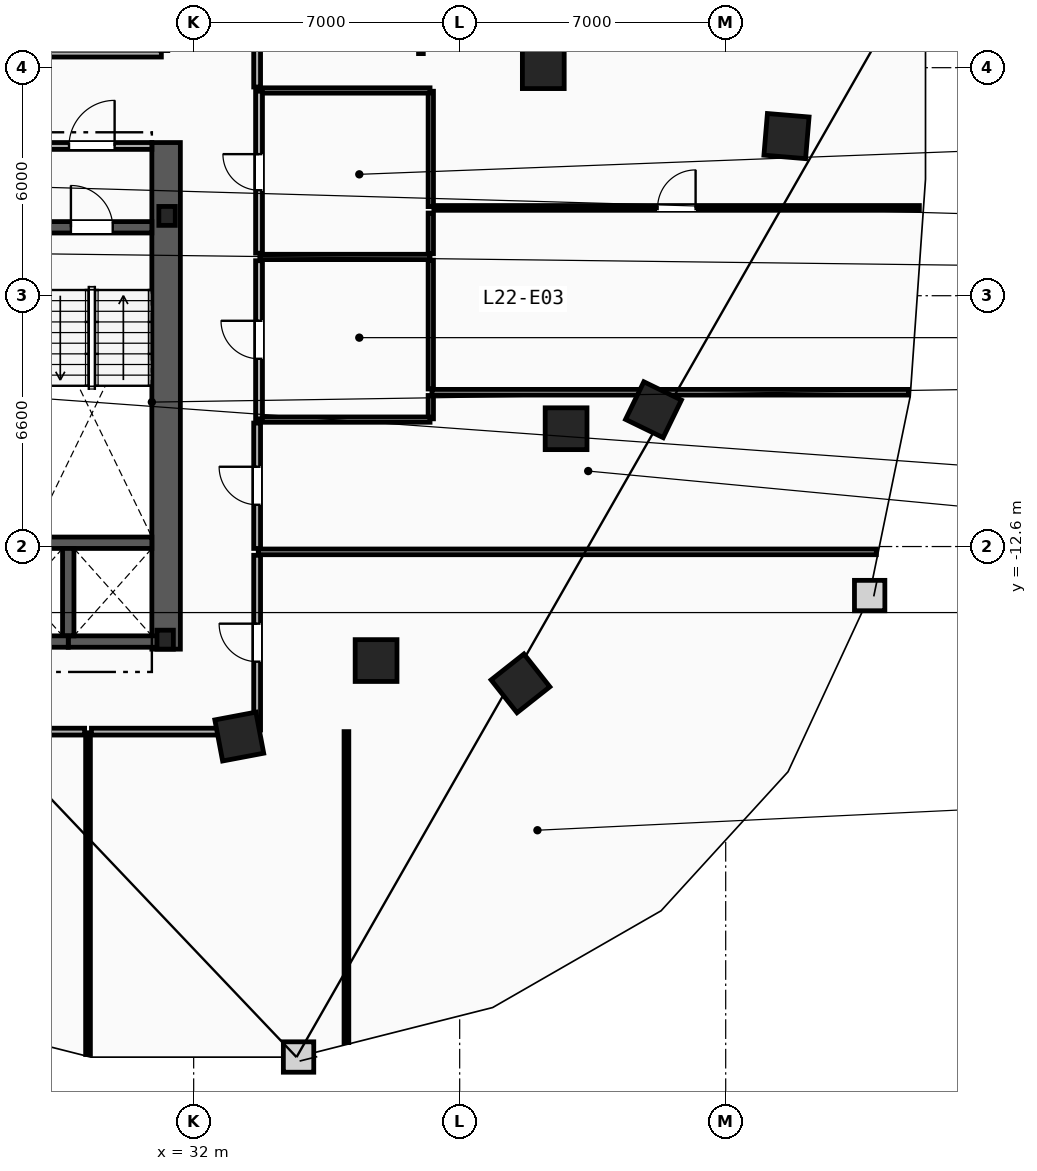
"""IFC4 building model, lengths in metres.
Left out: names, types, materials, properties, quantities, classifications, styles, units other than length and angle.
Written with IfcOpenShell. Run it as: python <this file> out.ifc"""

import sys

from ifc_helpers import new_model, si_unit, direction, frame, frame_2d, origin, origin_2d, place, context, subcontext, project, spatial, rectangle, i_section, extrude, element, fill, save


model = new_model("IFC4")
c1 = context("Model", 3, precision=1e-05, world=origin(), true_north=direction((0.0, 1.0)))
c2 = subcontext(c1, "Body", "Model", "MODEL_VIEW")
j1 = project(units=[si_unit("LENGTHUNIT", "METRE"), si_unit("PLANEANGLEUNIT", "RADIAN")], contexts=[c1])
p1 = place(None, origin())
s1 = spatial("IfcSite", under=j1, at=p1, CompositionType="ELEMENT")
p2 = place(p1, origin())
s2 = spatial("IfcBuilding", under=s1, at=p2, CompositionType="ELEMENT")
p3 = place(p2, frame((0.0, 0.0, 89.0)))
s3 = spatial("IfcBuildingStorey", under=s2, at=p3, CompositionType="ELEMENT", Elevation=89.0)
for number, where, z_axis, x_axis in (
    (1, (31.3, -3.9, 0.0), (0.0, 0.0, 1.0), (1.0, 0.0, 0.0)),
    (2, (31.25, -15.05, 0.0), (0.0, 0.0, 1.0), (1.0, 0.0, 0.0)),
):
    element("IfcColumn", number, at=place(p3, frame(where, z_axis=z_axis, x_axis=x_axis)), inside=s3, PredefinedType="COLUMN", context=c2, shape_type="SweptSolid", body=[
        extrude(i_section(OverallWidth=0.432, OverallDepth=0.498, WebThickness=0.056, FlangeThickness=0.089, FilletRadius=0.018, at=origin_2d()), origin(), (0.0, 0.0, 1.0), 3.6),
    ])
for number, where, z_axis, x_axis in (
    (3, (41.2, 0.0, 0.0), (0.0, 0.0, 1.0), (1.0, 0.0, 0.0)),
    (4, (41.8, -9.5, 0.0), (0.0, 0.0, 1.0), (1.0, 0.0, 0.0)),
    (5, (36.8, -15.6, 0.0), (0.0, 0.0, 1.0), (1.0, 0.0, 0.0)),
    (6, (33.2, -17.6, 0.0), (0.0, 0.0, 1.0), (0.983, 0.186, 0.0)),
    (7, (40.6, -16.2, 0.0), (0.0, 0.0, 1.0), (0.785, 0.619, 0.0)),
    (8, (44.1, -9.0, 0.0), (0.0, 0.0, 1.0), (0.437, 0.899, 0.0)),
    (9, (47.6, -1.8, 0.0), (0.0, 0.0, 1.0), (0.084, 0.997, 0.0)),
):
    element("IfcColumn", number, at=place(p3, frame(where, z_axis=z_axis, x_axis=x_axis)), inside=s3, PredefinedType="COLUMN", context=c2, shape_type="SweptSolid", body=[
        extrude(rectangle(XDim=1.1, YDim=1.1, at=origin_2d()), origin(), (0.0, 0.0, 1.0), 3.6),
    ])
p4 = place(p3, frame((31.275, -15.3, 0.0), z_axis=(0.0, 0.0, 1.0), x_axis=(0.0, 1.0, 0.0)))
e10 = element("IfcWall", 10, at=p4, inside=s3, PredefinedType="SHEAR", context=c2, shape_type="SweptSolid", body=[
    extrude(rectangle(XDim=13.33, YDim=0.75, at=frame_2d((6.665, 0.0))), origin(), (0.0, 0.0, 1.0), 3.3),
])
p5 = place(p3, frame((27.74, -4.2, 0.0), z_axis=(0.0, 0.0, 1.0), x_axis=(1.0, 0.0, 0.0)))
e11 = element("IfcWall", 11, at=p5, inside=s3, PredefinedType="SHEAR", context=c2, shape_type="SweptSolid", body=[
    extrude(rectangle(XDim=3.16, YDim=0.3, at=frame_2d((1.58, 0.0))), origin(), (0.0, 0.0, 1.0), 3.3),
])
p6 = place(p5, frame((1.03, 0.0, 0.0)))
e12 = element("IfcOpeningElement", 12, at=p6, cuts=e11, PredefinedType="OPENING", context=c2, shape_type="SweptSolid", body=[
    extrude(rectangle(XDim=1.1, YDim=2.15, at=frame_2d((0.55, 1.075))), frame((0.0, 0.16, 0.0), z_axis=(0.0, -1.0, 0.0), x_axis=(1.0, 0.0, 0.0)), (0.0, 0.0, 1.0), 0.32),
])
p7 = place(p3, frame((27.74, -12.5, 0.0), z_axis=(0.0, 0.0, 1.0), x_axis=(1.0, 0.0, 0.0)))
e13 = element("IfcWall", 13, at=p7, inside=s3, PredefinedType="SHEAR", context=c2, shape_type="SweptSolid", body=[
    extrude(rectangle(XDim=3.16, YDim=0.3, at=frame_2d((1.58, 0.0))), origin(), (0.0, 0.0, 1.0), 3.3),
])
p8 = place(p3, frame((27.74, -2.06, 0.0), z_axis=(0.0, 0.0, 1.0), x_axis=(1.0, 0.0, 0.0)))
e14 = element("IfcWall", 14, at=p8, inside=s3, PredefinedType="PARTITIONING", context=c2, shape_type="SweptSolid", body=[
    extrude(rectangle(XDim=3.16, YDim=0.18, at=frame_2d((1.58, 0.0))), origin(), (0.0, 0.0, 1.0), 3.3),
])
p9 = place(p8, frame((0.98, 0.0, 0.0)))
e15 = element("IfcOpeningElement", 15, at=p9, cuts=e14, PredefinedType="OPENING", context=c2, shape_type="SweptSolid", body=[
    extrude(rectangle(XDim=1.2, YDim=2.15, at=frame_2d((0.6, 1.075))), frame((0.0, 0.1, 0.0), z_axis=(0.0, -1.0, 0.0), x_axis=(1.0, 0.0, 0.0)), (0.0, 0.0, 1.0), 0.2),
])
p10 = place(p3, frame((28.7, -15.1, 0.0), z_axis=(0.0, 0.0, 1.0), x_axis=(1.0, 0.0, 0.0)))
e16 = element("IfcWall", 16, at=p10, inside=s3, PredefinedType="SHEAR", context=c2, shape_type="SweptSolid", body=[
    extrude(rectangle(XDim=2.5, YDim=0.3, at=frame_2d((1.25, 0.0))), origin(), (0.0, 0.0, 1.0), 3.3),
])
p11 = place(p3, frame((28.7, -14.95, 0.0), z_axis=(0.0, 0.0, 1.0), x_axis=(0.0, 1.0, 0.0)))
e17 = element("IfcWall", 17, at=p11, inside=s3, PredefinedType="SHEAR", context=c2, shape_type="SweptSolid", body=[
    extrude(rectangle(XDim=2.3, YDim=0.3, at=frame_2d((1.15, 0.0))), origin(), (0.0, 0.0, 1.0), 3.3),
])
p12 = place(p3, frame((26.2, -15.1, 0.0), z_axis=(0.0, 0.0, 1.0), x_axis=(1.0, 0.0, 0.0)))
e18 = element("IfcWall", 18, at=p12, inside=s3, PredefinedType="SHEAR", context=c2, shape_type="SweptSolid", body=[
    extrude(rectangle(XDim=2.5, YDim=0.3, at=frame_2d((1.25, 0.0))), origin(), (0.0, 0.0, 1.0), 3.3),
])
p13 = place(p3, frame((38.24, -9.24, 0.0), z_axis=(0.0, 0.0, 1.0), x_axis=(0.0, 1.0, 0.0)))
e19 = element("IfcWall", 19, at=p13, inside=s3, PredefinedType="PARTITIONING", context=c2, shape_type="SweptSolid", body=[
    extrude(rectangle(XDim=0.615, YDim=0.14, at=frame_2d((0.308, 0.0))), origin(), (0.0, 0.0, 1.0), 3.3),
])
p14 = place(p3, frame((38.24, -8.455, 0.0), z_axis=(0.0, 0.0, 1.0), x_axis=(0.0, 1.0, 0.0)))
e20 = element("IfcWall", 20, at=p14, inside=s3, PredefinedType="PARTITIONING", context=c2, shape_type="SweptSolid", body=[
    extrude(rectangle(XDim=3.39, YDim=0.14, at=frame_2d((1.695, 0.0))), origin(), (0.0, 0.0, 1.0), 3.3),
])
p15 = place(p3, frame((38.24, -4.895, 0.0), z_axis=(0.0, 0.0, 1.0), x_axis=(0.0, 1.0, 0.0)))
e21 = element("IfcWall", 21, at=p15, inside=s3, PredefinedType="PARTITIONING", context=c2, shape_type="SweptSolid", body=[
    extrude(rectangle(XDim=1.07, YDim=0.14, at=frame_2d((0.535, 0.0))), origin(), (0.0, 0.0, 1.0), 3.3),
])
p16 = place(p3, frame((38.24, -3.655, 0.0), z_axis=(0.0, 0.0, 1.0), x_axis=(0.0, 1.0, 0.0)))
e22 = element("IfcWall", 22, at=p16, inside=s3, PredefinedType="PARTITIONING", context=c2, shape_type="SweptSolid", body=[
    extrude(rectangle(XDim=3.035, YDim=0.14, at=frame_2d((1.518, 0.0))), origin(), (0.0, 0.0, 1.0), 3.3),
])
for number, where, z_axis, x_axis in (
    (23, (33.74, -0.6, 0.0), (0.0, 0.0, 1.0), (1.0, 0.0, 0.0)),
    (24, (33.74, -4.98, 0.0), (0.0, 0.0, 1.0), (1.0, 0.0, 0.0)),
    (25, (33.74, -9.26, 0.0), (0.0, 0.0, 1.0), (1.0, 0.0, 0.0)),
):
    element("IfcWall", number, at=place(p3, frame(where, z_axis=z_axis, x_axis=x_axis)), inside=s3, PredefinedType="PARTITIONING", context=c2, shape_type="SweptSolid", body=[
        extrude(rectangle(XDim=4.48, YDim=0.14, at=frame_2d((2.24, 0.0))), origin(), (0.0, 0.0, 1.0), 3.3),
    ])
p17 = place(p3, frame((33.72, -4.88, 0.0), z_axis=(0.0, 0.0, 1.0), x_axis=(0.0, 1.0, 0.0)))
e26 = element("IfcWall", 26, at=p17, inside=s3, PredefinedType="PARTITIONING", context=c2, shape_type="SweptSolid", body=[
    extrude(rectangle(XDim=4.26, YDim=0.18, at=frame_2d((2.13, 0.0))), origin(), (0.0, 0.0, 1.0), 3.3),
])
p18 = place(p17, frame((1.655, 0.0, 0.0)))
e27 = element("IfcOpeningElement", 27, at=p18, cuts=e26, PredefinedType="OPENING", context=c2, shape_type="SweptSolid", body=[
    extrude(rectangle(XDim=0.95, YDim=2.1, at=frame_2d((0.475, 1.05))), frame((0.0, 0.1, 0.0), z_axis=(0.0, -1.0, 0.0), x_axis=(1.0, 0.0, 0.0)), (0.0, 0.0, 1.0), 0.2),
])
p19 = place(p3, frame((33.72, -9.24, 0.0), z_axis=(0.0, 0.0, 1.0), x_axis=(0.0, 1.0, 0.0)))
e28 = element("IfcWall", 28, at=p19, inside=s3, PredefinedType="PARTITIONING", context=c2, shape_type="SweptSolid", body=[
    extrude(rectangle(XDim=4.16, YDim=0.18, at=frame_2d((2.08, 0.0))), origin(), (0.0, 0.0, 1.0), 3.3),
])
p20 = place(p19, frame((1.58, 0.0, 0.0)))
e29 = element("IfcOpeningElement", 29, at=p20, cuts=e28, PredefinedType="OPENING", context=c2, shape_type="SweptSolid", body=[
    extrude(rectangle(XDim=1.0, YDim=2.15, at=frame_2d((0.5, 1.075))), frame((0.0, 0.1, 0.0), z_axis=(0.0, -1.0, 0.0), x_axis=(1.0, 0.0, 0.0)), (0.0, 0.0, 1.0), 0.2),
])
p21 = place(p3, frame((37.98, 0.37, 0.0), z_axis=(0.0, 0.0, 1.0), x_axis=(0.0, 1.0, 0.0)))
e30 = element("IfcWall", 30, at=p21, inside=s3, PredefinedType="PARTITIONING", context=c2, shape_type="SweptSolid", body=[
    extrude(rectangle(XDim=11.08, YDim=0.125, at=frame_2d((5.54, 0.0))), origin(), (0.0, 0.0, 1.0), 3.3),
])
p22 = place(p3, frame((38.27, -8.54, 0.0), z_axis=(0.0, 0.0, 1.0), x_axis=(1.0, 0.0, 0.0)))
e31 = element("IfcWall", 31, at=p22, inside=s3, PredefinedType="PARTITIONING", context=c2, shape_type="SweptSolid", body=[
    extrude(rectangle(XDim=12.543, YDim=0.15, at=frame_2d((6.271, 0.0))), origin(), (0.0, 0.0, 1.0), 3.3),
])
p23 = place(p3, frame((33.7, -12.74, 0.0), z_axis=(0.0, 0.0, 1.0), x_axis=(1.0, 0.0, 0.0)))
e32 = element("IfcWall", 32, at=p23, inside=s3, PredefinedType="PARTITIONING", context=c2, shape_type="SweptSolid", body=[
    extrude(rectangle(XDim=16.264, YDim=0.15, at=frame_2d((8.132, 0.0))), origin(), (0.0, 0.0, 1.0), 3.3),
])
p24 = place(p3, frame((29.22, -25.966, 0.0), z_axis=(0.0, 0.0, 1.0), x_axis=(0.0, 1.0, 0.0)))
e33 = element("IfcWall", 33, at=p24, inside=s3, PredefinedType="PARTITIONING", context=c2, shape_type="SweptSolid", body=[
    extrude(rectangle(XDim=8.466, YDim=0.125, at=frame_2d((4.233, 0.0))), origin(), (0.0, 0.0, 1.0), 3.3),
])
p25 = place(p3, frame((36.02, -25.652, 0.0), z_axis=(0.0, 0.0, 1.0), x_axis=(0.0, 1.0, 0.0)))
e34 = element("IfcWall", 34, at=p25, inside=s3, PredefinedType="PARTITIONING", context=c2, shape_type="SweptSolid", body=[
    extrude(rectangle(XDim=8.182, YDim=0.125, at=frame_2d((4.091, 0.0))), origin(), (0.0, 0.0, 1.0), 3.3),
])
p26 = place(p3, frame((33.67, -17.428, 0.0), z_axis=(0.0, 0.0, 1.0), x_axis=(0.0, 1.0, 0.0)))
e35 = element("IfcWall", 35, at=p26, inside=s3, PredefinedType="PARTITIONING", context=c2, shape_type="SweptSolid", body=[
    extrude(rectangle(XDim=4.598, YDim=0.18, at=frame_2d((2.299, 0.0))), origin(), (0.0, 0.0, 1.0), 3.3),
])
p27 = place(p26, frame((1.799, 0.0, 0.0)))
e36 = element("IfcOpeningElement", 36, at=p27, cuts=e35, PredefinedType="OPENING", context=c2, shape_type="SweptSolid", body=[
    extrude(rectangle(XDim=1.0, YDim=2.15, at=frame_2d((0.5, 1.075))), frame((0.0, 0.1, 0.0), z_axis=(0.0, -1.0, 0.0), x_axis=(1.0, 0.0, 0.0)), (0.0, 0.0, 1.0), 0.2),
])
p28 = place(p3, frame((29.31, -17.47, 0.0), z_axis=(0.0, 0.0, 1.0), x_axis=(1.0, 0.0, 0.0)))
e37 = element("IfcWall", 37, at=p28, inside=s3, PredefinedType="PARTITIONING", context=c2, shape_type="SweptSolid", body=[
    extrude(rectangle(XDim=4.318, YDim=0.18, at=frame_2d((2.159, 0.0))), origin(), (0.0, 0.0, 1.0), 3.3),
])
p29 = place(p3, frame((33.67, -12.65, 0.0), z_axis=(0.0, 0.0, 1.0), x_axis=(0.0, 1.0, 0.0)))
e38 = element("IfcWall", 38, at=p29, inside=s3, PredefinedType="PARTITIONING", context=c2, shape_type="SweptSolid", body=[
    extrude(rectangle(XDim=3.299, YDim=0.18, at=frame_2d((1.649, 0.0))), origin(), (0.0, 0.0, 1.0), 3.3),
])
p30 = place(p29, frame((1.149, 0.0, 0.0)))
e39 = element("IfcOpeningElement", 39, at=p30, cuts=e38, PredefinedType="OPENING", context=c2, shape_type="SweptSolid", body=[
    extrude(rectangle(XDim=1.0, YDim=2.15, at=frame_2d((0.5, 1.075))), frame((0.0, 0.1, 0.0), z_axis=(0.0, -1.0, 0.0), x_axis=(1.0, 0.0, 0.0)), (0.0, 0.0, 1.0), 0.2),
])
p31 = place(p3, frame((31.15, 0.37, 0.0), z_axis=(0.0, 0.0, 1.0), x_axis=(-1.0, 0.0, 0.0)))
e40 = element("IfcWall", 40, at=p31, inside=s3, PredefinedType="PARTITIONING", context=c2, shape_type="SweptSolid", body=[
    extrude(rectangle(XDim=14.328, YDim=0.18, at=frame_2d((7.164, 0.0))), origin(), (0.0, 0.0, 1.0), 3.3),
])
p32 = place(p31, frame((6.664, 0.0, 0.0)))
e41 = element("IfcOpeningElement", 41, at=p32, cuts=e40, PredefinedType="OPENING", context=c2, shape_type="SweptSolid", body=[
    extrude(rectangle(XDim=1.0, YDim=2.15, at=frame_2d((0.5, 1.075))), frame((0.0, 0.1, 0.0), z_axis=(0.0, -1.0, 0.0), x_axis=(1.0, 0.0, 0.0)), (0.0, 0.0, 1.0), 0.2),
])
p33 = place(p3, frame((16.822, -17.47, 0.0), z_axis=(0.0, 0.0, 1.0), x_axis=(1.0, 0.0, 0.0)))
e42 = element("IfcWall", 42, at=p33, inside=s3, PredefinedType="PARTITIONING", context=c2, shape_type="SweptSolid", body=[
    extrude(rectangle(XDim=12.308, YDim=0.18, at=frame_2d((6.154, 0.0))), origin(), (0.0, 0.0, 1.0), 3.3),
])
p34 = place(p3, frame((33.67, -0.509, 0.0), z_axis=(0.0, 0.0, 1.0), x_axis=(0.0, 1.0, 0.0)))
e43 = element("IfcWall", 43, at=p34, inside=s3, PredefinedType="PARTITIONING", context=c2, shape_type="SweptSolid", body=[
    extrude(rectangle(XDim=11.908, YDim=0.18, at=frame_2d((5.954, 0.0))), origin(), (0.0, 0.0, 1.0), 3.3),
])
p35 = place(p34, frame((5.454, 0.0, 0.0)))
e44 = element("IfcOpeningElement", 44, at=p35, cuts=e43, PredefinedType="OPENING", context=c2, shape_type="SweptSolid", body=[
    extrude(rectangle(XDim=1.0, YDim=2.15, at=frame_2d((0.5, 1.075))), frame((0.0, 0.1, 0.0), z_axis=(0.0, -1.0, 0.0), x_axis=(1.0, 0.0, 0.0)), (0.0, 0.0, 1.0), 0.2),
])
p36 = place(p3, frame((38.32, -3.69, 0.0), z_axis=(0.0, 0.0, 1.0), x_axis=(1.0, 0.0, 0.0)))
e45 = element("IfcWall", 45, at=p36, inside=s3, PredefinedType="PARTITIONING", context=c2, shape_type="SweptSolid", body=[
    extrude(rectangle(XDim=12.776, YDim=0.125, at=frame_2d((6.388, 0.0))), origin(), (0.0, 0.0, 1.0), 3.3),
])
p37 = place(p36, frame((5.888, 0.0, 0.0)))
e46 = element("IfcOpeningElement", 46, at=p37, cuts=e45, PredefinedType="OPENING", context=c2, shape_type="SweptSolid", body=[
    extrude(rectangle(XDim=1.0, YDim=2.15, at=frame_2d((0.5, 1.075))), frame((0.0, 0.073, 0.0), z_axis=(0.0, -1.0, 0.0), x_axis=(1.0, 0.0, 0.0)), (0.0, 0.0, 1.0), 0.145),
])
p38 = place(p6, origin())
e47 = element("IfcDoor", 47, at=p38, inside=s3, OperationType="SINGLE_SWING_LEFT", PredefinedType="DOOR", context=c2, shape_type="SweptSolid", body=[
    extrude(rectangle(XDim=1.1, YDim=2.15, at=frame_2d((0.55, 1.075))), frame((0.0, 0.025, 0.0), z_axis=(0.0, -1.0, 0.0), x_axis=(1.0, 0.0, 0.0)), (0.0, 0.0, 1.0), 0.05),
])
fill(e12, e47)
p39 = place(p9, origin())
e48 = element("IfcDoor", 48, at=p39, inside=s3, OperationType="SINGLE_SWING_RIGHT", PredefinedType="DOOR", context=c2, shape_type="SweptSolid", body=[
    extrude(rectangle(XDim=1.2, YDim=2.15, at=frame_2d((0.6, 1.075))), frame((0.0, 0.025, 0.0), z_axis=(0.0, -1.0, 0.0), x_axis=(1.0, 0.0, 0.0)), (0.0, 0.0, 1.0), 0.05),
])
fill(e15, e48)
p40 = place(p37, origin())
e49 = element("IfcDoor", 49, at=p40, inside=s3, OperationType="SINGLE_SWING_RIGHT", PredefinedType="DOOR", context=c2, shape_type="SweptSolid", body=[
    extrude(rectangle(XDim=1.0, YDim=2.15, at=frame_2d((0.5, 1.075))), frame((0.0, 0.025, 0.0), z_axis=(0.0, -1.0, 0.0), x_axis=(1.0, 0.0, 0.0)), (0.0, 0.0, 1.0), 0.05),
])
fill(e46, e49)
p41 = place(p27, origin())
e50 = element("IfcDoor", 50, at=p41, inside=s3, OperationType="SINGLE_SWING_RIGHT", PredefinedType="DOOR", context=c2, shape_type="SweptSolid", body=[
    extrude(rectangle(XDim=1.0, YDim=2.15, at=frame_2d((0.5, 1.075))), frame((0.0, 0.025, 0.0), z_axis=(0.0, -1.0, 0.0), x_axis=(1.0, 0.0, 0.0)), (0.0, 0.0, 1.0), 0.05),
])
fill(e36, e50)
p42 = place(p18, origin())
e51 = element("IfcDoor", 51, at=p42, inside=s3, OperationType="SINGLE_SWING_RIGHT", PredefinedType="DOOR", context=c2, shape_type="SweptSolid", body=[
    extrude(rectangle(XDim=0.95, YDim=2.1, at=frame_2d((0.475, 1.05))), frame((0.0, 0.025, 0.0), z_axis=(0.0, -1.0, 0.0), x_axis=(1.0, 0.0, 0.0)), (0.0, 0.0, 1.0), 0.05),
])
fill(e27, e51)
p43 = place(p20, origin())
e52 = element("IfcDoor", 52, at=p43, inside=s3, OperationType="SINGLE_SWING_RIGHT", PredefinedType="DOOR", context=c2, shape_type="SweptSolid", body=[
    extrude(rectangle(XDim=1.0, YDim=2.15, at=frame_2d((0.5, 1.075))), frame((0.0, 0.025, 0.0), z_axis=(0.0, -1.0, 0.0), x_axis=(1.0, 0.0, 0.0)), (0.0, 0.0, 1.0), 0.05),
])
fill(e29, e52)
p44 = place(p30, origin())
e53 = element("IfcDoor", 53, at=p44, inside=s3, OperationType="SINGLE_SWING_RIGHT", PredefinedType="DOOR", context=c2, shape_type="SweptSolid", body=[
    extrude(rectangle(XDim=1.0, YDim=2.15, at=frame_2d((0.5, 1.075))), frame((0.0, 0.025, 0.0), z_axis=(0.0, -1.0, 0.0), x_axis=(1.0, 0.0, 0.0)), (0.0, 0.0, 1.0), 0.05),
])
fill(e39, e53)
save(model, sys.argv[1])
